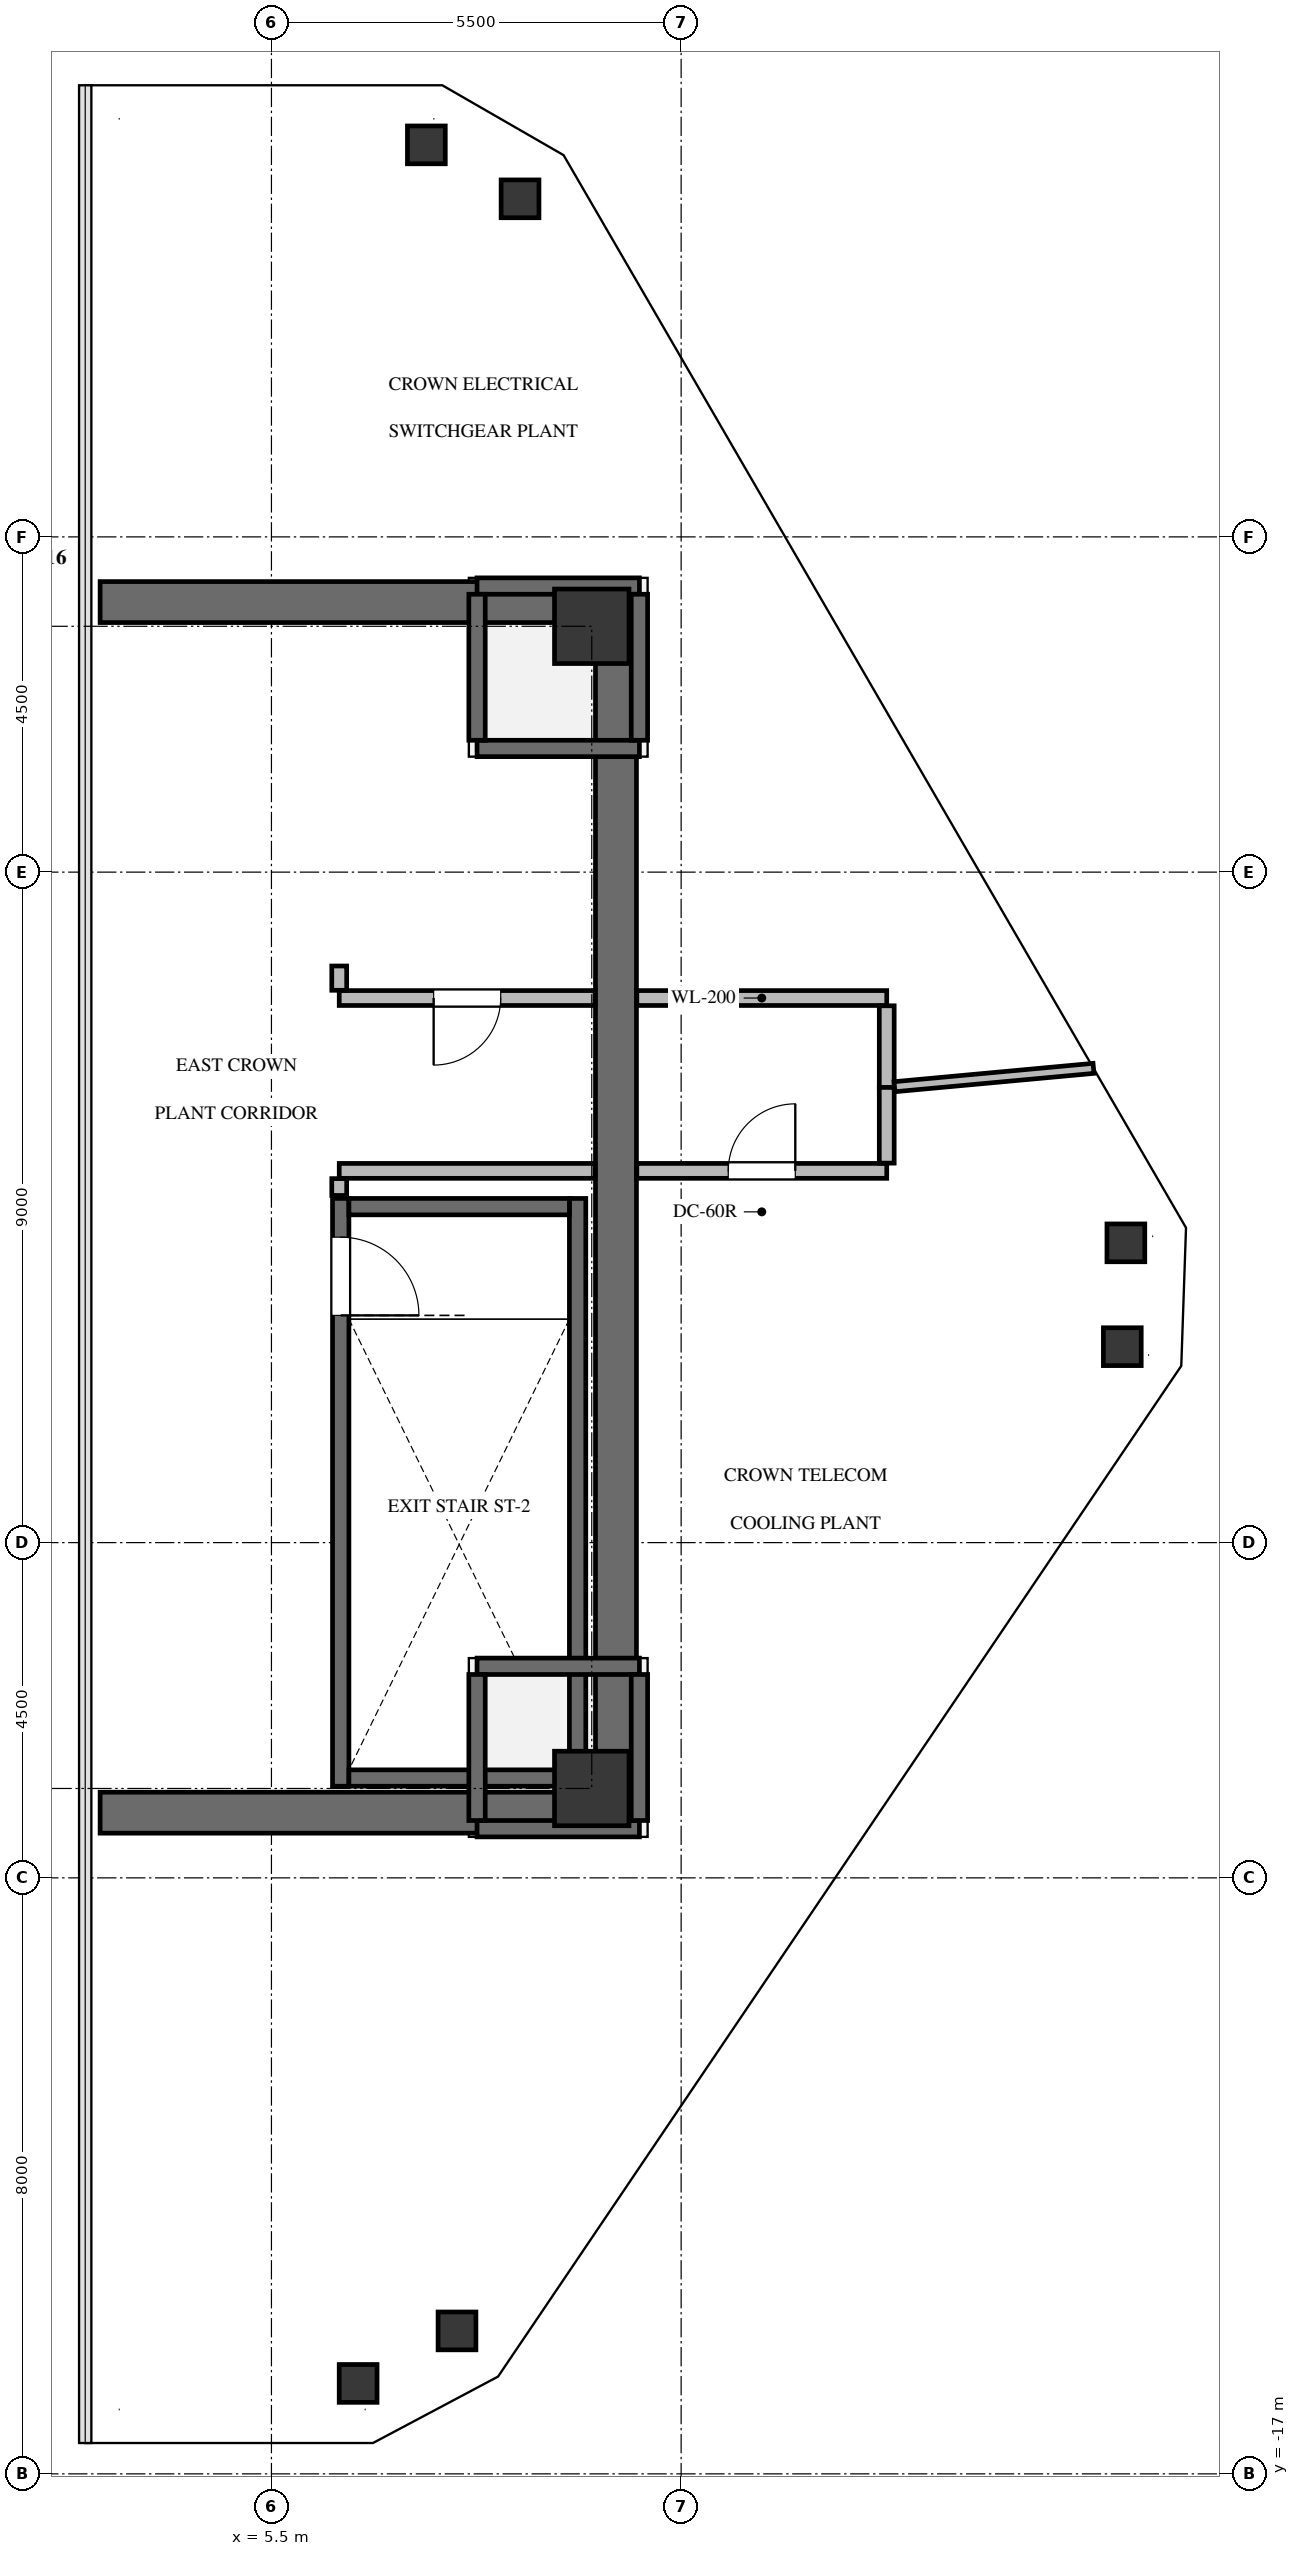
"""IFC4 building model, lengths in metres.
Left out: names, types, materials, properties, quantities, classifications, styles, units other than length and angle.
Written with IfcOpenShell. Run it as: python <this file> out.ifc"""

import sys

from ifc_helpers import new_model, si_unit, direction, frame, frame_2d, origin, origin_2d, place, context, subcontext, project, spatial, rectangle, hollow_circle, extrude, source, transform, mapped, element, fill, save


model = new_model("IFC4")
c1 = context("Model", 3, precision=1e-05, world=origin(), true_north=direction((0.0, 1.0)))
c2 = subcontext(c1, "Body", "Model", "MODEL_VIEW")
j1 = project(units=[si_unit("LENGTHUNIT", "METRE"), si_unit("PLANEANGLEUNIT", "RADIAN")], contexts=[c1])
p1 = place(None, origin())
s1 = spatial("IfcSite", under=j1, at=p1, CompositionType="ELEMENT")
p2 = place(p1, origin())
s2 = spatial("IfcBuilding", under=s1, at=p2, CompositionType="ELEMENT")
p3 = place(p2, frame((0.0, 0.0, 287.0)))
s3 = spatial("IfcBuildingStorey", under=s2, at=p3, CompositionType="ELEMENT", Elevation=287.0)
p4 = place(p3, frame((10.125, -8.4, 0.0), z_axis=(0.0, 0.0, 1.0), x_axis=(0.0, 1.0, 0.0)))
e1 = element("IfcWall", 1, at=p4, inside=s3, PredefinedType="SHEAR", context=c2, shape_type="SweptSolid", body=[
    extrude(rectangle(XDim=16.8, YDim=0.55, at=frame_2d((8.4, 0.0))), origin(), (0.0, 0.0, 1.0), 12.18),
])
for number, where, z_axis, x_axis in (
    (2, (3.2, -8.125, 0.0), (0.0, 0.0, 1.0), (1.0, 0.0, 0.0)),
    (3, (3.2, 8.125, 0.0), (0.0, 0.0, 1.0), (1.0, 0.0, 0.0)),
):
    element("IfcWall", number, at=place(p3, frame(where, z_axis=z_axis, x_axis=x_axis)), inside=s3, PredefinedType="SHEAR", context=c2, shape_type="SweptSolid", body=[
        extrude(rectangle(XDim=6.65, YDim=0.55, at=frame_2d((3.325, 0.0))), origin(), (0.0, 0.0, 1.0), 12.18),
    ])
p5 = place(p3, frame((9.61, -7.77, -0.28), z_axis=(0.0, 0.0, 1.0), x_axis=(0.0, 1.0, 0.0)))
e4 = element("IfcWall", 4, at=p5, inside=s3, PredefinedType="SHEAR", context=c2, shape_type="SweptSolid", body=[
    extrude(rectangle(XDim=7.89, YDim=0.22, at=frame_2d((3.945, 0.0))), origin(), (0.0, 0.0, 1.0), 5.0),
])
p6 = place(p3, frame((6.43, 0.12, -0.28), z_axis=(0.0, 0.0, 1.0), x_axis=(0.0, -1.0, 0.0)))
e5 = element("IfcWall", 5, at=p6, inside=s3, PredefinedType="SHEAR", context=c2, shape_type="SweptSolid", body=[
    extrude(rectangle(XDim=7.89, YDim=0.22, at=frame_2d((3.945, 0.0))), origin(), (0.0, 0.0, 1.0), 5.0),
])
p7 = place(p6, frame((0.52, 0.0, 0.0)))
e6 = element("IfcOpeningElement", 6, at=p7, cuts=e5, PredefinedType="OPENING", context=c2, shape_type="SweptSolid", body=[
    extrude(rectangle(XDim=1.05, YDim=2.15, at=frame_2d((0.525, 1.075))), frame((0.0, 0.12, 0.0), z_axis=(0.0, -1.0, 0.0), x_axis=(1.0, 0.0, 0.0)), (0.0, 0.0, 1.0), 0.24),
])
for number, where, z_axis, x_axis in (
    (7, (6.54, -7.66, -0.28), (0.0, 0.0, 1.0), (1.0, 0.0, 0.0)),
    (8, (9.5, 0.01, -0.28), (0.0, 0.0, 1.0), (-1.0, 0.0, 0.0)),
):
    element("IfcWall", number, at=place(p3, frame(where, z_axis=z_axis, x_axis=x_axis)), inside=s3, PredefinedType="SHEAR", context=c2, shape_type="SweptSolid", body=[
        extrude(rectangle(XDim=2.96, YDim=0.22, at=frame_2d((1.48, 0.0))), origin(), (0.0, 0.0, 1.0), 5.0),
    ])
m1 = source(origin(), c2, "Body", "SweptSolid", [
    extrude(rectangle(XDim=1.0, YDim=1.0, at=origin_2d()), origin(), (0.0, 0.0, 1.0), 5.0),
])
for number, where, z_axis, x_axis in (
    (9, (9.8, -7.8, -0.28), (0.0, 0.0, 1.0), (1.0, 0.0, 0.0)),
    (10, (9.8, 7.8, -0.28), (0.0, 0.0, 1.0), (1.0, 0.0, 0.0)),
):
    element("IfcColumn", number, at=place(p3, frame(where, z_axis=z_axis, x_axis=x_axis)), inside=s3, PredefinedType="COLUMN", context=c2, shape_type="MappedRepresentation", body=[
        mapped(m1, transform((0.0, 0.0, 0.0), x_axis=(1.0, 0.0, 0.0), y_axis=(0.0, 1.0, 0.0), z_axis=(0.0, 0.0, 1.0), scale=1.0)),
    ])
m2 = source(origin(), c2, "Body", "SweptSolid", [
    extrude(hollow_circle(Radius=0.254, WallThickness=0.012, at=origin_2d()), origin(), (0.0, 0.0, 1.0), 5.0),
])
for number, where, z_axis, x_axis in (
    (11, (7.58, 14.262, -0.28), (0.0, 0.0, 1.0), (1.0, 0.0, 0.0)),
    (12, (8.837, 13.538, -0.28), (0.0, 0.0, 1.0), (1.0, 0.0, 0.0)),
    (13, (16.97, -0.476, -0.28), (0.0, 0.0, 1.0), (1.0, 0.0, 0.0)),
    (14, (16.922, -1.87, -0.28), (0.0, 0.0, 1.0), (1.0, 0.0, 0.0)),
    (15, (7.991, -15.081, -0.28), (0.0, 0.0, 1.0), (1.0, 0.0, 0.0)),
    (16, (6.664, -15.786, -0.28), (0.0, 0.0, 1.0), (1.0, 0.0, 0.0)),
):
    element("IfcColumn", number, at=place(p3, frame(where, z_axis=z_axis, x_axis=x_axis)), inside=s3, PredefinedType="COLUMN", context=c2, shape_type="MappedRepresentation", body=[
        mapped(m2, transform((0.0, 0.0, 0.0), x_axis=(1.0, 0.0, 0.0), y_axis=(0.0, 1.0, 0.0), z_axis=(0.0, 0.0, 1.0), scale=1.0)),
    ])
for number, where, z_axis, x_axis in (
    (17, (8.26, -8.34, 12.22), (0.0, 0.0, 1.0), (1.0, 0.0, 0.0)),
    (18, (8.26, -6.16, 12.22), (0.0, 0.0, 1.0), (1.0, 0.0, 0.0)),
):
    element("IfcWall", number, at=place(p3, frame(where, z_axis=z_axis, x_axis=x_axis)), inside=s3, PredefinedType="SHEAR", context=c2, shape_type="SweptSolid", body=[
        extrude(rectangle(XDim=2.18, YDim=0.22, at=frame_2d((1.09, 0.0))), origin(), (0.0, 0.0, 1.0), 3.57),
    ])
for number, where, z_axis, x_axis in (
    (19, (8.26, -8.23, 12.22), (0.0, 0.0, 1.0), (0.0, 1.0, 0.0)),
    (20, (10.44, -8.23, 12.22), (0.0, 0.0, 1.0), (0.0, 1.0, 0.0)),
):
    element("IfcWall", number, at=place(p3, frame(where, z_axis=z_axis, x_axis=x_axis)), inside=s3, PredefinedType="SHEAR", context=c2, shape_type="SweptSolid", body=[
        extrude(rectangle(XDim=1.96, YDim=0.22, at=frame_2d((0.98, 0.0))), origin(), (0.0, 0.0, 1.0), 3.57),
    ])
for number, where, z_axis, x_axis in (
    (21, (8.26, 6.16, 12.22), (0.0, 0.0, 1.0), (1.0, 0.0, 0.0)),
    (22, (8.26, 8.34, 12.22), (0.0, 0.0, 1.0), (1.0, 0.0, 0.0)),
):
    element("IfcWall", number, at=place(p3, frame(where, z_axis=z_axis, x_axis=x_axis)), inside=s3, PredefinedType="SHEAR", context=c2, shape_type="SweptSolid", body=[
        extrude(rectangle(XDim=2.18, YDim=0.22, at=frame_2d((1.09, 0.0))), origin(), (0.0, 0.0, 1.0), 3.57),
    ])
for number, where, z_axis, x_axis in (
    (23, (8.26, 6.27, 12.22), (0.0, 0.0, 1.0), (0.0, 1.0, 0.0)),
    (24, (10.44, 6.27, 12.22), (0.0, 0.0, 1.0), (0.0, 1.0, 0.0)),
):
    element("IfcWall", number, at=place(p3, frame(where, z_axis=z_axis, x_axis=x_axis)), inside=s3, PredefinedType="SHEAR", context=c2, shape_type="SweptSolid", body=[
        extrude(rectangle(XDim=1.96, YDim=0.22, at=frame_2d((0.98, 0.0))), origin(), (0.0, 0.0, 1.0), 3.57),
    ])
p8 = place(p3, frame((13.76, 2.81, 0.0), z_axis=(0.0, 0.0, 1.0), x_axis=(-1.0, 0.0, 0.0)))
e25 = element("IfcWall", 25, at=p8, inside=s3, PredefinedType="SOLIDWALL", context=c2, shape_type="SweptSolid", body=[
    extrude(rectangle(XDim=3.355, YDim=0.2, at=frame_2d((1.677, 0.0))), origin(), (0.0, 0.0, 1.0), 3.961),
])
p9 = place(p3, frame((9.845, 2.81, 0.0), z_axis=(0.0, 0.0, 1.0), x_axis=(-1.0, 0.0, 0.0)))
e26 = element("IfcWall", 26, at=p9, inside=s3, PredefinedType="SOLIDWALL", context=c2, shape_type="SweptSolid", body=[
    extrude(rectangle(XDim=3.435, YDim=0.2, at=frame_2d((1.718, 0.0))), origin(), (0.0, 0.0, 1.0), 4.705),
])
p10 = place(p9, frame((1.268, 0.0, 0.0)))
e27 = element("IfcOpeningElement", 27, at=p10, cuts=e26, PredefinedType="OPENING", context=c2, shape_type="SweptSolid", body=[
    extrude(rectangle(XDim=0.9, YDim=2.05, at=frame_2d((0.45, 1.025))), frame((0.0, 0.11, 0.0), z_axis=(0.0, -1.0, 0.0), x_axis=(1.0, 0.0, 0.0)), (0.0, 0.0, 1.0), 0.22),
])
p11 = place(p3, frame((13.76, 1.61, 0.0), z_axis=(0.0, 0.0, 1.0), x_axis=(0.0, 1.0, 0.0)))
e28 = element("IfcWall", 28, at=p11, inside=s3, PredefinedType="SOLIDWALL", context=c2, shape_type="SweptSolid", body=[
    extrude(rectangle(XDim=1.096, YDim=0.2, at=frame_2d((0.548, 0.0))), origin(), (0.0, 0.0, 1.0), 3.961),
])
p12 = place(p3, frame((6.41, 2.914, 0.0), z_axis=(0.0, 0.0, 1.0), x_axis=(0.0, 1.0, 0.0)))
e29 = element("IfcWall", 29, at=p12, inside=s3, PredefinedType="SOLIDWALL", context=c2, shape_type="SweptSolid", body=[
    extrude(rectangle(XDim=0.326, YDim=0.2, at=frame_2d((0.163, 0.0))), origin(), (0.0, 0.0, 1.0), 4.705),
])
p13 = place(p3, frame((6.41, 0.49, 0.0), z_axis=(0.0, 0.0, 1.0), x_axis=(1.0, 0.0, 0.0)))
e30 = element("IfcWall", 30, at=p13, inside=s3, PredefinedType="SOLIDWALL", context=c2, shape_type="SweptSolid", body=[
    extrude(rectangle(XDim=3.435, YDim=0.2, at=frame_2d((1.718, 0.0))), origin(), (0.0, 0.0, 1.0), 4.705),
])
p14 = place(p3, frame((10.405, 0.49, 0.0), z_axis=(0.0, 0.0, 1.0), x_axis=(1.0, 0.0, 0.0)))
e31 = element("IfcWall", 31, at=p14, inside=s3, PredefinedType="SOLIDWALL", context=c2, shape_type="SweptSolid", body=[
    extrude(rectangle(XDim=3.355, YDim=0.2, at=frame_2d((1.677, 0.0))), origin(), (0.0, 0.0, 1.0), 3.961),
])
p15 = place(p14, frame((1.228, 0.0, 0.0)))
e32 = element("IfcOpeningElement", 32, at=p15, cuts=e31, PredefinedType="OPENING", context=c2, shape_type="SweptSolid", body=[
    extrude(rectangle(XDim=0.9, YDim=2.05, at=frame_2d((0.45, 1.025))), frame((0.0, 0.11, 0.0), z_axis=(0.0, -1.0, 0.0), x_axis=(1.0, 0.0, 0.0)), (0.0, 0.0, 1.0), 0.22),
])
p16 = place(p3, frame((13.76, 0.594, 0.0), z_axis=(0.0, 0.0, 1.0), x_axis=(0.0, 1.0, 0.0)))
e33 = element("IfcWall", 33, at=p16, inside=s3, PredefinedType="SOLIDWALL", context=c2, shape_type="SweptSolid", body=[
    extrude(rectangle(XDim=1.016, YDim=0.2, at=frame_2d((0.508, 0.0))), origin(), (0.0, 0.0, 1.0), 3.961),
])
p17 = place(p3, frame((6.41, 0.16, 0.0), z_axis=(0.0, 0.0, 1.0), x_axis=(0.0, 1.0, 0.0)))
e34 = element("IfcWall", 34, at=p17, inside=s3, PredefinedType="SOLIDWALL", context=c2, shape_type="SweptSolid", body=[
    extrude(rectangle(XDim=0.226, YDim=0.2, at=frame_2d((0.113, 0.0))), origin(), (0.0, 0.0, 1.0), 4.705),
])
p18 = place(p3, frame((16.536, 1.866, 0.0), z_axis=(0.0, 0.0, 1.0), x_axis=(-0.995776794664, -0.091807272096, 0.0)))
e35 = element("IfcWall", 35, at=p18, inside=s3, PredefinedType="PARTITIONING", context=c2, shape_type="SweptSolid", body=[
    extrude(rectangle(XDim=2.683, YDim=0.135, at=frame_2d((1.342, 0.0))), origin(), (0.0, 0.0, 1.0), 3.961),
])
p19 = place(p3, frame((9.35, -7.25, 16.049)))
p20 = place(p19, frame((0.0, 0.0, 0.276)))
e36 = element("IfcWindow", 36, at=p20, inside=s3, PartitioningType="SINGLE_PANEL", PredefinedType="SKYLIGHT", context=c2, shape_type="SweptSolid", body=[
    extrude(rectangle(XDim=1.4, YDim=1.4, at=origin_2d()), origin(), (0.0, 0.0, 1.0), 0.05),
])
p21 = place(p3, frame((9.35, 7.25, 16.049)))
p22 = place(p21, frame((0.0, 0.0, 0.276)))
e37 = element("IfcWindow", 37, at=p22, inside=s3, PartitioningType="SINGLE_PANEL", PredefinedType="SKYLIGHT", context=c2, shape_type="SweptSolid", body=[
    extrude(rectangle(XDim=1.2, YDim=1.2, at=origin_2d()), origin(), (0.0, 0.0, 1.0), 0.05),
])
m3 = source(origin(), c2, "Body", "SweptSolid", [
    extrude(rectangle(XDim=1.05, YDim=2.15, at=frame_2d((0.525, 1.075))), frame((0.0, 0.025, 0.0), z_axis=(0.0, -1.0, 0.0), x_axis=(1.0, 0.0, 0.0)), (0.0, 0.0, 1.0), 0.05),
])
p23 = place(p7, origin())
e38 = element("IfcDoor", 38, at=p23, inside=s3, OperationType="SINGLE_SWING_RIGHT", PredefinedType="DOOR", context=c2, shape_type="MappedRepresentation", body=[
    mapped(m3, transform((0.0, 0.0, 0.0), x_axis=(1.0, 0.0, 0.0), y_axis=(0.0, 1.0, 0.0), z_axis=(0.0, 0.0, 1.0), scale=1.0)),
])
fill(e6, e38)
m4 = source(origin(), c2, "Body", "SweptSolid", [
    extrude(rectangle(XDim=0.9, YDim=2.05, at=frame_2d((0.45, 1.025))), frame((0.0, 0.025, 0.0), z_axis=(0.0, -1.0, 0.0), x_axis=(1.0, 0.0, 0.0)), (0.0, 0.0, 1.0), 0.05),
])
p24 = place(p10, origin())
e39 = element("IfcDoor", 39, at=p24, inside=s3, OperationType="SINGLE_SWING_RIGHT", PredefinedType="DOOR", context=c2, shape_type="MappedRepresentation", body=[
    mapped(m4, transform((0.0, 0.0, 0.0), x_axis=(1.0, 0.0, 0.0), y_axis=(0.0, 1.0, 0.0), z_axis=(0.0, 0.0, 1.0), scale=1.0)),
])
fill(e27, e39)
p25 = place(p15, origin())
e40 = element("IfcDoor", 40, at=p25, inside=s3, OperationType="SINGLE_SWING_RIGHT", PredefinedType="DOOR", context=c2, shape_type="MappedRepresentation", body=[
    mapped(m4, transform((0.0, 0.0, 0.0), x_axis=(1.0, 0.0, 0.0), y_axis=(0.0, 1.0, 0.0), z_axis=(0.0, 0.0, 1.0), scale=1.0)),
])
fill(e32, e40)
save(model, sys.argv[1])
